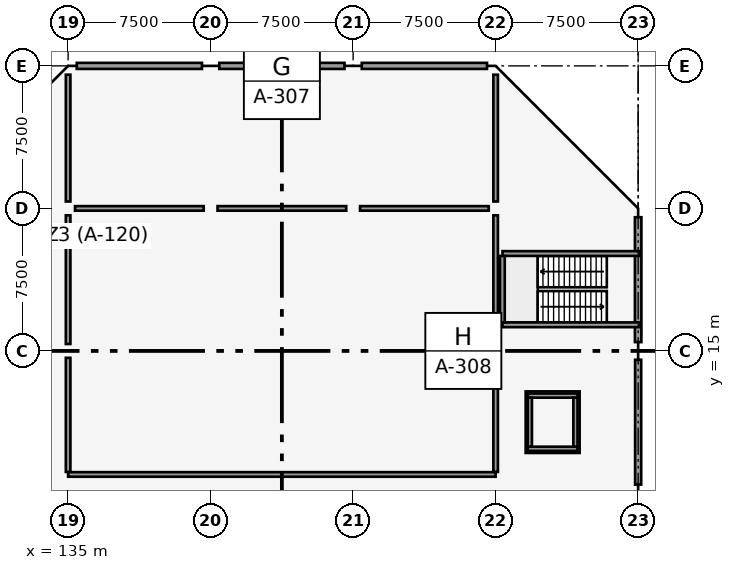
"""IFC4 building model, lengths in metres.
Left out: names, types, materials, properties, quantities, classifications, styles, units other than length and angle.
Written with IfcOpenShell. Run it as: python <this file> out.ifc"""

import sys

from ifc_helpers import new_model, si_unit, direction, frame, frame_2d, origin, origin_2d, place, context, subcontext, project, spatial, rectangle, circle, extrude, element, fill, save


model = new_model("IFC4")
c1 = context("Model", 3, precision=1e-05, world=origin(), true_north=direction((0.0, 1.0)))
c2 = subcontext(c1, "Body", "Model", "MODEL_VIEW")
j1 = project(units=[si_unit("LENGTHUNIT", "METRE"), si_unit("PLANEANGLEUNIT", "RADIAN")], contexts=[c1])
p1 = place(None, origin())
s1 = spatial("IfcSite", under=j1, at=p1, CompositionType="ELEMENT")
p2 = place(p1, origin())
s2 = spatial("IfcBuilding", under=s1, at=p2, CompositionType="ELEMENT")
p3 = place(p2, origin())
s3 = spatial("IfcBuildingStorey", under=s2, at=p3, CompositionType="ELEMENT", Elevation=0.0)
for number, where, z_axis, x_axis in (
    (1, (135.0, 7.5, 0.0), (0.0, 0.0, 1.0), (1.0, 0.0, 0.0)),
    (2, (135.0, 15.0, 0.0), (0.0, 0.0, 1.0), (1.0, 0.0, 0.0)),
    (3, (135.0, 22.5, 0.0), (0.0, 0.0, 1.0), (1.0, 0.0, 0.0)),
):
    element("IfcColumn", number, at=place(p3, frame(where, z_axis=z_axis, x_axis=x_axis)), inside=s3, PredefinedType="COLUMN", context=c2, shape_type="SweptSolid", body=[
        extrude(rectangle(XDim=0.7, YDim=0.7, at=origin_2d()), origin(), (0.0, 0.0, 1.0), 4.8),
    ])
p4 = place(p3, frame((135.0, 30.0, 0.0), z_axis=(0.0, 0.0, 1.0), x_axis=(1.0, 0.0, 0.0)))
e4 = element("IfcColumn", 4, at=p4, inside=s3, PredefinedType="COLUMN", context=c2, shape_type="SweptSolid", body=[
    extrude(circle(Radius=0.45, at=origin_2d()), origin(), (0.0, 0.0, 1.0), 4.8),
])
for number, where, z_axis, x_axis in (
    (5, (142.5, 7.5, 0.0), (0.0, 0.0, 1.0), (1.0, 0.0, 0.0)),
    (6, (142.5, 22.5, 0.0), (0.0, 0.0, 1.0), (1.0, 0.0, 0.0)),
):
    element("IfcColumn", number, at=place(p3, frame(where, z_axis=z_axis, x_axis=x_axis)), inside=s3, PredefinedType="COLUMN", context=c2, shape_type="SweptSolid", body=[
        extrude(rectangle(XDim=0.7, YDim=0.7, at=origin_2d()), origin(), (0.0, 0.0, 1.0), 4.8),
    ])
p5 = place(p3, frame((142.5, 30.0, 0.0), z_axis=(0.0, 0.0, 1.0), x_axis=(1.0, 0.0, 0.0)))
e7 = element("IfcColumn", 7, at=p5, inside=s3, PredefinedType="COLUMN", context=c2, shape_type="SweptSolid", body=[
    extrude(circle(Radius=0.45, at=origin_2d()), origin(), (0.0, 0.0, 1.0), 4.8),
])
for number, where, z_axis, x_axis in (
    (8, (150.0, 7.5, 0.0), (0.0, 0.0, 1.0), (1.0, 0.0, 0.0)),
    (9, (150.0, 22.5, 0.0), (0.0, 0.0, 1.0), (1.0, 0.0, 0.0)),
):
    element("IfcColumn", number, at=place(p3, frame(where, z_axis=z_axis, x_axis=x_axis)), inside=s3, PredefinedType="COLUMN", context=c2, shape_type="SweptSolid", body=[
        extrude(rectangle(XDim=0.7, YDim=0.7, at=origin_2d()), origin(), (0.0, 0.0, 1.0), 4.8),
    ])
p6 = place(p3, frame((150.0, 30.0, 0.0), z_axis=(0.0, 0.0, 1.0), x_axis=(1.0, 0.0, 0.0)))
e10 = element("IfcColumn", 10, at=p6, inside=s3, PredefinedType="COLUMN", context=c2, shape_type="SweptSolid", body=[
    extrude(circle(Radius=0.45, at=origin_2d()), origin(), (0.0, 0.0, 1.0), 4.8),
])
for number, where, z_axis, x_axis in (
    (11, (157.5, 7.5, 0.0), (0.0, 0.0, 1.0), (1.0, 0.0, 0.0)),
    (12, (157.5, 15.0, 0.0), (0.0, 0.0, 1.0), (1.0, 0.0, 0.0)),
    (13, (157.5, 22.5, 0.0), (0.0, 0.0, 1.0), (1.0, 0.0, 0.0)),
):
    element("IfcColumn", number, at=place(p3, frame(where, z_axis=z_axis, x_axis=x_axis)), inside=s3, PredefinedType="COLUMN", context=c2, shape_type="SweptSolid", body=[
        extrude(rectangle(XDim=0.7, YDim=0.7, at=origin_2d()), origin(), (0.0, 0.0, 1.0), 4.8),
    ])
for number, where, z_axis, x_axis in (
    (14, (157.5, 30.0, 0.0), (0.0, 0.0, 1.0), (1.0, 0.0, 0.0)),
    (15, (165.0, 7.5, 0.0), (0.0, 0.0, 1.0), (1.0, 0.0, 0.0)),
    (16, (165.0, 15.0, 0.0), (0.0, 0.0, 1.0), (1.0, 0.0, 0.0)),
    (17, (165.0, 22.5, 0.0), (0.0, 0.0, 1.0), (1.0, 0.0, 0.0)),
):
    element("IfcColumn", number, at=place(p3, frame(where, z_axis=z_axis, x_axis=x_axis)), inside=s3, PredefinedType="COLUMN", context=c2, shape_type="SweptSolid", body=[
        extrude(circle(Radius=0.45, at=origin_2d()), origin(), (0.0, 0.0, 1.0), 4.8),
    ])
p7 = place(p3, frame((165.0, 7.965, 0.0), z_axis=(0.0, 0.0, 1.0), x_axis=(0.0, 1.0, 0.0)))
e18 = element("IfcWall", 18, at=p7, inside=s3, PredefinedType="SOLIDWALL", context=c2, shape_type="SweptSolid", body=[
    extrude(rectangle(XDim=6.57, YDim=0.32, at=frame_2d((3.285, 0.0))), origin(), (0.0, 0.0, 1.0), 3.42),
])
p8 = place(p7, frame((2.435, 0.0, 0.6)))
e19 = element("IfcOpeningElement", 19, at=p8, cuts=e18, PredefinedType="OPENING", context=c2, shape_type="SweptSolid", body=[
    extrude(rectangle(XDim=1.7, YDim=1.8, at=frame_2d((0.85, 0.9))), frame((0.0, 0.17, 0.0), z_axis=(0.0, -1.0, 0.0), x_axis=(1.0, 0.0, 0.0)), (0.0, 0.0, 1.0), 0.34),
])
p9 = place(p3, frame((165.0, 15.465, 0.0), z_axis=(0.0, 0.0, 1.0), x_axis=(0.0, 1.0, 0.0)))
e20 = element("IfcWall", 20, at=p9, inside=s3, PredefinedType="SOLIDWALL", context=c2, shape_type="SweptSolid", body=[
    extrude(rectangle(XDim=6.57, YDim=0.34, at=frame_2d((3.285, 0.0))), origin(), (0.0, 0.0, 1.0), 3.42),
])
p10 = place(p9, frame((2.172, 0.0, 0.0)))
e21 = element("IfcOpeningElement", 21, at=p10, cuts=e20, PredefinedType="OPENING", context=c2, shape_type="SweptSolid", body=[
    extrude(rectangle(XDim=1.6, YDim=2.15, at=frame_2d((0.8, 1.075))), frame((0.0, 0.18, 0.0), z_axis=(0.0, -1.0, 0.0), x_axis=(1.0, 0.0, 0.0)), (0.0, 0.0, 1.0), 0.36),
])
p11 = place(p3, frame((157.045, 30.0, 0.0), z_axis=(0.0, 0.0, 1.0), x_axis=(-1.0, 0.0, 0.0)))
e22 = element("IfcWall", 22, at=p11, inside=s3, PredefinedType="SOLIDWALL", context=c2, shape_type="SweptSolid", body=[
    extrude(rectangle(XDim=6.59, YDim=0.32, at=frame_2d((3.295, 0.0))), origin(), (0.0, 0.0, 1.0), 3.72),
])
p12 = place(p11, frame((2.72, 0.0, 0.6)))
e23 = element("IfcOpeningElement", 23, at=p12, cuts=e22, PredefinedType="OPENING", context=c2, shape_type="SweptSolid", body=[
    extrude(rectangle(XDim=1.15, YDim=1.3, at=frame_2d((0.575, 0.65))), frame((0.0, 0.17, 0.0), z_axis=(0.0, -1.0, 0.0), x_axis=(1.0, 0.0, 0.0)), (0.0, 0.0, 1.0), 0.34),
])
p13 = place(p3, frame((149.545, 30.0, 0.0), z_axis=(0.0, 0.0, 1.0), x_axis=(-1.0, 0.0, 0.0)))
e24 = element("IfcWall", 24, at=p13, inside=s3, PredefinedType="SOLIDWALL", context=c2, shape_type="SweptSolid", body=[
    extrude(rectangle(XDim=6.59, YDim=0.32, at=frame_2d((3.295, 0.0))), origin(), (0.0, 0.0, 1.0), 3.72),
])
p14 = place(p13, frame((2.645, 0.0, 0.6)))
e25 = element("IfcOpeningElement", 25, at=p14, cuts=e24, PredefinedType="OPENING", context=c2, shape_type="SweptSolid", body=[
    extrude(rectangle(XDim=1.3, YDim=1.3, at=frame_2d((0.65, 0.65))), frame((0.0, 0.17, 0.0), z_axis=(0.0, -1.0, 0.0), x_axis=(1.0, 0.0, 0.0)), (0.0, 0.0, 1.0), 0.34),
])
p15 = place(p3, frame((142.045, 30.0, 0.0), z_axis=(0.0, 0.0, 1.0), x_axis=(-1.0, 0.0, 0.0)))
e26 = element("IfcWall", 26, at=p15, inside=s3, PredefinedType="SOLIDWALL", context=c2, shape_type="SweptSolid", body=[
    extrude(rectangle(XDim=6.59, YDim=0.32, at=frame_2d((3.295, 0.0))), origin(), (0.0, 0.0, 1.0), 3.72),
])
p16 = place(p15, frame((2.57, 0.0, 0.6)))
e27 = element("IfcOpeningElement", 27, at=p16, cuts=e26, PredefinedType="OPENING", context=c2, shape_type="SweptSolid", body=[
    extrude(rectangle(XDim=1.45, YDim=1.3, at=frame_2d((0.725, 0.65))), frame((0.0, 0.17, 0.0), z_axis=(0.0, -1.0, 0.0), x_axis=(1.0, 0.0, 0.0)), (0.0, 0.0, 1.0), 0.34),
])
p17 = place(p3, frame((157.86, 16.375, 0.0), z_axis=(0.0, 0.0, 1.0), x_axis=(1.0, 0.0, 0.0)))
e28 = element("IfcWall", 28, at=p17, inside=s3, PredefinedType="SOLIDWALL", context=c2, shape_type="SweptSolid", body=[
    extrude(rectangle(XDim=7.26, YDim=0.25, at=frame_2d((3.63, 0.0))), origin(), (0.0, 0.0, 1.0), 4.5),
])
p18 = place(p17, frame((5.71, 0.0, 0.0)))
e29 = element("IfcOpeningElement", 29, at=p18, cuts=e28, PredefinedType="OPENING", context=c2, shape_type="SweptSolid", body=[
    extrude(rectangle(XDim=1.1, YDim=2.15, at=frame_2d((0.55, 1.075))), frame((0.0, 0.135, 0.0), z_axis=(0.0, -1.0, 0.0), x_axis=(1.0, 0.0, 0.0)), (0.0, 0.0, 1.0), 0.27),
])
p19 = place(p3, frame((157.86, 20.125, 0.0), z_axis=(0.0, 0.0, 1.0), x_axis=(1.0, 0.0, 0.0)))
e30 = element("IfcWall", 30, at=p19, inside=s3, PredefinedType="SOLIDWALL", context=c2, shape_type="SweptSolid", body=[
    extrude(rectangle(XDim=7.26, YDim=0.25, at=frame_2d((3.63, 0.0))), origin(), (0.0, 0.0, 1.0), 4.5),
])
p20 = place(p3, frame((157.855, 16.5, 0.0), z_axis=(0.0, 0.0, 1.0), x_axis=(0.0, 1.0, 0.0)))
e31 = element("IfcWall", 31, at=p20, inside=s3, PredefinedType="SOLIDWALL", context=c2, shape_type="SweptSolid", body=[
    extrude(rectangle(XDim=3.5, YDim=0.25, at=frame_2d((1.75, 0.0))), origin(), (0.0, 0.0, 1.0), 4.5),
])
for number, where, z_axis, x_axis in (
    (32, (159.19, 9.85, 0.0), (0.0, 0.0, 1.0), (1.0, 0.0, 0.0)),
    (33, (159.19, 12.65, 0.0), (0.0, 0.0, 1.0), (1.0, 0.0, 0.0)),
):
    element("IfcWall", number, at=place(p3, frame(where, z_axis=z_axis, x_axis=x_axis)), inside=s3, PredefinedType="SOLIDWALL", context=c2, shape_type="SweptSolid", body=[
        extrude(rectangle(XDim=2.62, YDim=0.22, at=frame_2d((1.31, 0.0))), origin(), (0.0, 0.0, 1.0), 4.5),
    ])
p21 = place(p3, frame((159.3, 9.96, 0.0), z_axis=(0.0, 0.0, 1.0), x_axis=(0.0, 1.0, 0.0)))
e34 = element("IfcWall", 34, at=p21, inside=s3, PredefinedType="SOLIDWALL", context=c2, shape_type="SweptSolid", body=[
    extrude(rectangle(XDim=2.58, YDim=0.22, at=frame_2d((1.29, 0.0))), origin(), (0.0, 0.0, 1.0), 4.5),
])
p22 = place(p21, frame((0.79, 0.0, 0.0)))
e35 = element("IfcOpeningElement", 35, at=p22, cuts=e34, PredefinedType="OPENING", context=c2, shape_type="SweptSolid", body=[
    extrude(rectangle(XDim=1.0, YDim=2.15, at=frame_2d((0.5, 1.075))), frame((0.0, 0.12, 0.0), z_axis=(0.0, -1.0, 0.0), x_axis=(1.0, 0.0, 0.0)), (0.0, 0.0, 1.0), 0.24),
])
p23 = place(p3, frame((161.7, 9.96, 0.0), z_axis=(0.0, 0.0, 1.0), x_axis=(0.0, 1.0, 0.0)))
e36 = element("IfcWall", 36, at=p23, inside=s3, PredefinedType="SOLIDWALL", context=c2, shape_type="SweptSolid", body=[
    extrude(rectangle(XDim=2.58, YDim=0.22, at=frame_2d((1.29, 0.0))), origin(), (0.0, 0.0, 1.0), 4.5),
])
p24 = place(p3, frame((135.0, 8.5, 0.0), z_axis=(0.0, 0.0, 1.0), x_axis=(1.0, 0.0, 0.0)))
e37 = element("IfcWall", 37, at=p24, inside=s3, PredefinedType="PARTITIONING", context=c2, shape_type="SweptSolid", body=[
    extrude(rectangle(XDim=22.5, YDim=0.24, at=frame_2d((11.25, 0.0))), origin(), (0.0, 0.0, 1.0), 2.97),
])
p25 = place(p24, frame((10.35, 0.0, 0.0)))
e38 = element("IfcOpeningElement", 38, at=p25, cuts=e37, PredefinedType="OPENING", context=c2, shape_type="SweptSolid", body=[
    extrude(rectangle(XDim=1.8, YDim=2.16, at=frame_2d((0.9, 1.08))), frame((0.0, 0.13, 0.0), z_axis=(0.0, -1.0, 0.0), x_axis=(1.0, 0.0, 0.0)), (0.0, 0.0, 1.0), 0.26),
])
p26 = place(p3, frame((135.364, 22.5, 0.0), z_axis=(0.0, 0.0, 1.0), x_axis=(1.0, 0.0, 0.0)))
e39 = element("IfcWall", 39, at=p26, inside=s3, PredefinedType="PARTITIONING", context=c2, shape_type="SweptSolid", body=[
    extrude(rectangle(XDim=6.772, YDim=0.24, at=frame_2d((3.386, 0.0))), origin(), (0.0, 0.0, 1.0), 2.97),
])
p27 = place(p3, frame((142.864, 22.5, 0.0), z_axis=(0.0, 0.0, 1.0), x_axis=(1.0, 0.0, 0.0)))
e40 = element("IfcWall", 40, at=p27, inside=s3, PredefinedType="PARTITIONING", context=c2, shape_type="SweptSolid", body=[
    extrude(rectangle(XDim=6.772, YDim=0.24, at=frame_2d((3.386, 0.0))), origin(), (0.0, 0.0, 1.0), 2.97),
])
p28 = place(p27, frame((2.486, 0.0, 0.0)))
e41 = element("IfcOpeningElement", 41, at=p28, cuts=e40, PredefinedType="OPENING", context=c2, shape_type="SweptSolid", body=[
    extrude(rectangle(XDim=1.8, YDim=2.16, at=frame_2d((0.9, 1.08))), frame((0.0, 0.13, 0.0), z_axis=(0.0, -1.0, 0.0), x_axis=(1.0, 0.0, 0.0)), (0.0, 0.0, 1.0), 0.26),
])
p29 = place(p3, frame((150.364, 22.5, 0.0), z_axis=(0.0, 0.0, 1.0), x_axis=(1.0, 0.0, 0.0)))
e42 = element("IfcWall", 42, at=p29, inside=s3, PredefinedType="PARTITIONING", context=c2, shape_type="SweptSolid", body=[
    extrude(rectangle(XDim=6.772, YDim=0.24, at=frame_2d((3.386, 0.0))), origin(), (0.0, 0.0, 1.0), 2.97),
])
p30 = place(p3, frame((135.0, 8.634, 0.0), z_axis=(0.0, 0.0, 1.0), x_axis=(0.0, 1.0, 0.0)))
e43 = element("IfcWall", 43, at=p30, inside=s3, PredefinedType="PARTITIONING", context=c2, shape_type="SweptSolid", body=[
    extrude(rectangle(XDim=6.002, YDim=0.24, at=frame_2d((3.001, 0.0))), origin(), (0.0, 0.0, 1.0), 3.52),
])
p31 = place(p30, frame((3.066, 0.0, 0.0)))
e44 = element("IfcOpeningElement", 44, at=p31, cuts=e43, PredefinedType="OPENING", context=c2, shape_type="SweptSolid", body=[
    extrude(rectangle(XDim=1.6, YDim=2.16, at=frame_2d((0.8, 1.08))), frame((0.0, 0.13, 0.0), z_axis=(0.0, -1.0, 0.0), x_axis=(1.0, 0.0, 0.0)), (0.0, 0.0, 1.0), 0.26),
])
p32 = place(p3, frame((135.0, 15.364, 0.0), z_axis=(0.0, 0.0, 1.0), x_axis=(0.0, 1.0, 0.0)))
e45 = element("IfcWall", 45, at=p32, inside=s3, PredefinedType="PARTITIONING", context=c2, shape_type="SweptSolid", body=[
    extrude(rectangle(XDim=6.772, YDim=0.24, at=frame_2d((3.386, 0.0))), origin(), (0.0, 0.0, 1.0), 3.42),
])
p33 = place(p3, frame((135.0, 22.864, 0.0), z_axis=(0.0, 0.0, 1.0), x_axis=(0.0, 1.0, 0.0)))
e46 = element("IfcWall", 46, at=p33, inside=s3, PredefinedType="PARTITIONING", context=c2, shape_type="SweptSolid", body=[
    extrude(rectangle(XDim=6.672, YDim=0.24, at=frame_2d((3.336, 0.0))), origin(), (0.0, 0.0, 1.0), 3.42),
])
p34 = place(p33, frame((2.736, 0.0, 0.0)))
e47 = element("IfcOpeningElement", 47, at=p34, cuts=e46, PredefinedType="OPENING", context=c2, shape_type="SweptSolid", body=[
    extrude(rectangle(XDim=1.3, YDim=2.15, at=frame_2d((0.65, 1.075))), frame((0.0, 0.13, 0.0), z_axis=(0.0, -1.0, 0.0), x_axis=(1.0, 0.0, 0.0)), (0.0, 0.0, 1.0), 0.26),
])
p35 = place(p3, frame((157.5, 8.634, 0.0), z_axis=(0.0, 0.0, 1.0), x_axis=(0.0, 1.0, 0.0)))
e48 = element("IfcWall", 48, at=p35, inside=s3, PredefinedType="PARTITIONING", context=c2, shape_type="SweptSolid", body=[
    extrude(rectangle(XDim=6.002, YDim=0.24, at=frame_2d((3.001, 0.0))), origin(), (0.0, 0.0, 1.0), 3.42),
])
p36 = place(p35, frame((3.066, 0.0, 0.0)))
e49 = element("IfcOpeningElement", 49, at=p36, cuts=e48, PredefinedType="OPENING", context=c2, shape_type="SweptSolid", body=[
    extrude(rectangle(XDim=1.6, YDim=2.16, at=frame_2d((0.8, 1.08))), frame((0.0, 0.13, 0.0), z_axis=(0.0, -1.0, 0.0), x_axis=(1.0, 0.0, 0.0)), (0.0, 0.0, 1.0), 0.26),
])
p37 = place(p3, frame((157.5, 15.364, 0.0), z_axis=(0.0, 0.0, 1.0), x_axis=(0.0, 1.0, 0.0)))
e50 = element("IfcWall", 50, at=p37, inside=s3, PredefinedType="PARTITIONING", context=c2, shape_type="SweptSolid", body=[
    extrude(rectangle(XDim=6.772, YDim=0.24, at=frame_2d((3.386, 0.0))), origin(), (0.0, 0.0, 1.0), 3.42),
])
p38 = place(p3, frame((157.5, 22.864, 0.0), z_axis=(0.0, 0.0, 1.0), x_axis=(0.0, 1.0, 0.0)))
e51 = element("IfcWall", 51, at=p38, inside=s3, PredefinedType="PARTITIONING", context=c2, shape_type="SweptSolid", body=[
    extrude(rectangle(XDim=6.672, YDim=0.24, at=frame_2d((3.336, 0.0))), origin(), (0.0, 0.0, 1.0), 3.42),
])
p39 = place(p38, frame((2.736, 0.0, 0.0)))
e52 = element("IfcOpeningElement", 52, at=p39, cuts=e51, PredefinedType="OPENING", context=c2, shape_type="SweptSolid", body=[
    extrude(rectangle(XDim=1.3, YDim=2.15, at=frame_2d((0.65, 1.075))), frame((0.0, 0.13, 0.0), z_axis=(0.0, -1.0, 0.0), x_axis=(1.0, 0.0, 0.0)), (0.0, 0.0, 1.0), 0.26),
])
p40 = place(p8, origin())
e53 = element("IfcWindow", 53, at=p40, inside=s3, PartitioningType="SINGLE_PANEL", PredefinedType="WINDOW", context=c2, shape_type="SweptSolid", body=[
    extrude(rectangle(XDim=1.7, YDim=1.8, at=frame_2d((0.85, 0.9))), frame((0.0, 0.03, 0.0), z_axis=(0.0, -1.0, 0.0), x_axis=(1.0, 0.0, 0.0)), (0.0, 0.0, 1.0), 0.06),
])
fill(e19, e53)
p41 = place(p10, frame((1.6, 0.0, 0.0), z_axis=(0.0, 0.0, 1.0), x_axis=(-1.0, 0.0, 0.0)))
e54 = element("IfcDoor", 54, at=p41, inside=s3, OperationType="SINGLE_SWING_RIGHT", PredefinedType="DOOR", context=c2, shape_type="SweptSolid", body=[
    extrude(rectangle(XDim=1.6, YDim=2.15, at=frame_2d((0.8, 1.075))), frame((0.0, 0.025, 0.0), z_axis=(0.0, -1.0, 0.0), x_axis=(1.0, 0.0, 0.0)), (0.0, 0.0, 1.0), 0.05),
])
fill(e21, e54)
p42 = place(p12, origin())
e55 = element("IfcWindow", 55, at=p42, inside=s3, PartitioningType="SINGLE_PANEL", PredefinedType="WINDOW", context=c2, shape_type="SweptSolid", body=[
    extrude(rectangle(XDim=1.15, YDim=1.3, at=frame_2d((0.575, 0.65))), frame((0.0, 0.03, 0.0), z_axis=(0.0, -1.0, 0.0), x_axis=(1.0, 0.0, 0.0)), (0.0, 0.0, 1.0), 0.06),
])
fill(e23, e55)
p43 = place(p14, origin())
e56 = element("IfcWindow", 56, at=p43, inside=s3, PartitioningType="SINGLE_PANEL", PredefinedType="WINDOW", context=c2, shape_type="SweptSolid", body=[
    extrude(rectangle(XDim=1.3, YDim=1.3, at=frame_2d((0.65, 0.65))), frame((0.0, 0.03, 0.0), z_axis=(0.0, -1.0, 0.0), x_axis=(1.0, 0.0, 0.0)), (0.0, 0.0, 1.0), 0.06),
])
fill(e25, e56)
p44 = place(p16, origin())
e57 = element("IfcWindow", 57, at=p44, inside=s3, PartitioningType="SINGLE_PANEL", PredefinedType="WINDOW", context=c2, shape_type="SweptSolid", body=[
    extrude(rectangle(XDim=1.45, YDim=1.3, at=frame_2d((0.725, 0.65))), frame((0.0, 0.03, 0.0), z_axis=(0.0, -1.0, 0.0), x_axis=(1.0, 0.0, 0.0)), (0.0, 0.0, 1.0), 0.06),
])
fill(e27, e57)
p45 = place(p18, origin())
e58 = element("IfcDoor", 58, at=p45, inside=s3, OperationType="SINGLE_SWING_RIGHT", PredefinedType="DOOR", context=c2, shape_type="SweptSolid", body=[
    extrude(rectangle(XDim=1.1, YDim=2.15, at=frame_2d((0.55, 1.075))), frame((0.0, 0.025, 0.0), z_axis=(0.0, -1.0, 0.0), x_axis=(1.0, 0.0, 0.0)), (0.0, 0.0, 1.0), 0.05),
])
fill(e29, e58)
p46 = place(p22, origin())
e59 = element("IfcDoor", 59, at=p46, inside=s3, OperationType="SLIDING_TO_LEFT", PredefinedType="DOOR", context=c2, shape_type="SweptSolid", body=[
    extrude(rectangle(XDim=1.0, YDim=2.15, at=frame_2d((0.5, 1.075))), frame((0.0, 0.025, 0.0), z_axis=(0.0, -1.0, 0.0), x_axis=(1.0, 0.0, 0.0)), (0.0, 0.0, 1.0), 0.05),
])
fill(e35, e59)
p47 = place(p25, origin())
e60 = element("IfcDoor", 60, at=p47, inside=s3, OperationType="SINGLE_SWING_RIGHT", PredefinedType="DOOR", context=c2, shape_type="SweptSolid", body=[
    extrude(rectangle(XDim=1.8, YDim=2.16, at=frame_2d((0.9, 1.08))), frame((0.0, 0.025, 0.0), z_axis=(0.0, -1.0, 0.0), x_axis=(1.0, 0.0, 0.0)), (0.0, 0.0, 1.0), 0.05),
])
fill(e38, e60)
p48 = place(p28, origin())
e61 = element("IfcDoor", 61, at=p48, inside=s3, OperationType="SINGLE_SWING_LEFT", PredefinedType="DOOR", context=c2, shape_type="SweptSolid", body=[
    extrude(rectangle(XDim=1.8, YDim=2.16, at=frame_2d((0.9, 1.08))), frame((0.0, 0.025, 0.0), z_axis=(0.0, -1.0, 0.0), x_axis=(1.0, 0.0, 0.0)), (0.0, 0.0, 1.0), 0.05),
])
fill(e41, e61)
p49 = place(p31, origin())
e62 = element("IfcDoor", 62, at=p49, inside=s3, OperationType="SINGLE_SWING_RIGHT", PredefinedType="DOOR", context=c2, shape_type="SweptSolid", body=[
    extrude(rectangle(XDim=1.6, YDim=2.16, at=frame_2d((0.8, 1.08))), frame((0.0, 0.025, 0.0), z_axis=(0.0, -1.0, 0.0), x_axis=(1.0, 0.0, 0.0)), (0.0, 0.0, 1.0), 0.05),
])
fill(e44, e62)
p50 = place(p34, origin())
e63 = element("IfcDoor", 63, at=p50, inside=s3, OperationType="SINGLE_SWING_LEFT", PredefinedType="DOOR", context=c2, shape_type="SweptSolid", body=[
    extrude(rectangle(XDim=1.3, YDim=2.15, at=frame_2d((0.65, 1.075))), frame((0.0, 0.025, 0.0), z_axis=(0.0, -1.0, 0.0), x_axis=(1.0, 0.0, 0.0)), (0.0, 0.0, 1.0), 0.05),
])
fill(e47, e63)
p51 = place(p36, origin())
e64 = element("IfcDoor", 64, at=p51, inside=s3, OperationType="SINGLE_SWING_RIGHT", PredefinedType="DOOR", context=c2, shape_type="SweptSolid", body=[
    extrude(rectangle(XDim=1.6, YDim=2.16, at=frame_2d((0.8, 1.08))), frame((0.0, 0.025, 0.0), z_axis=(0.0, -1.0, 0.0), x_axis=(1.0, 0.0, 0.0)), (0.0, 0.0, 1.0), 0.05),
])
fill(e49, e64)
p52 = place(p39, origin())
e65 = element("IfcDoor", 65, at=p52, inside=s3, OperationType="SINGLE_SWING_LEFT", PredefinedType="DOOR", context=c2, shape_type="SweptSolid", body=[
    extrude(rectangle(XDim=1.3, YDim=2.15, at=frame_2d((0.65, 1.075))), frame((0.0, 0.025, 0.0), z_axis=(0.0, -1.0, 0.0), x_axis=(1.0, 0.0, 0.0)), (0.0, 0.0, 1.0), 0.05),
])
fill(e52, e65)
save(model, sys.argv[1])
